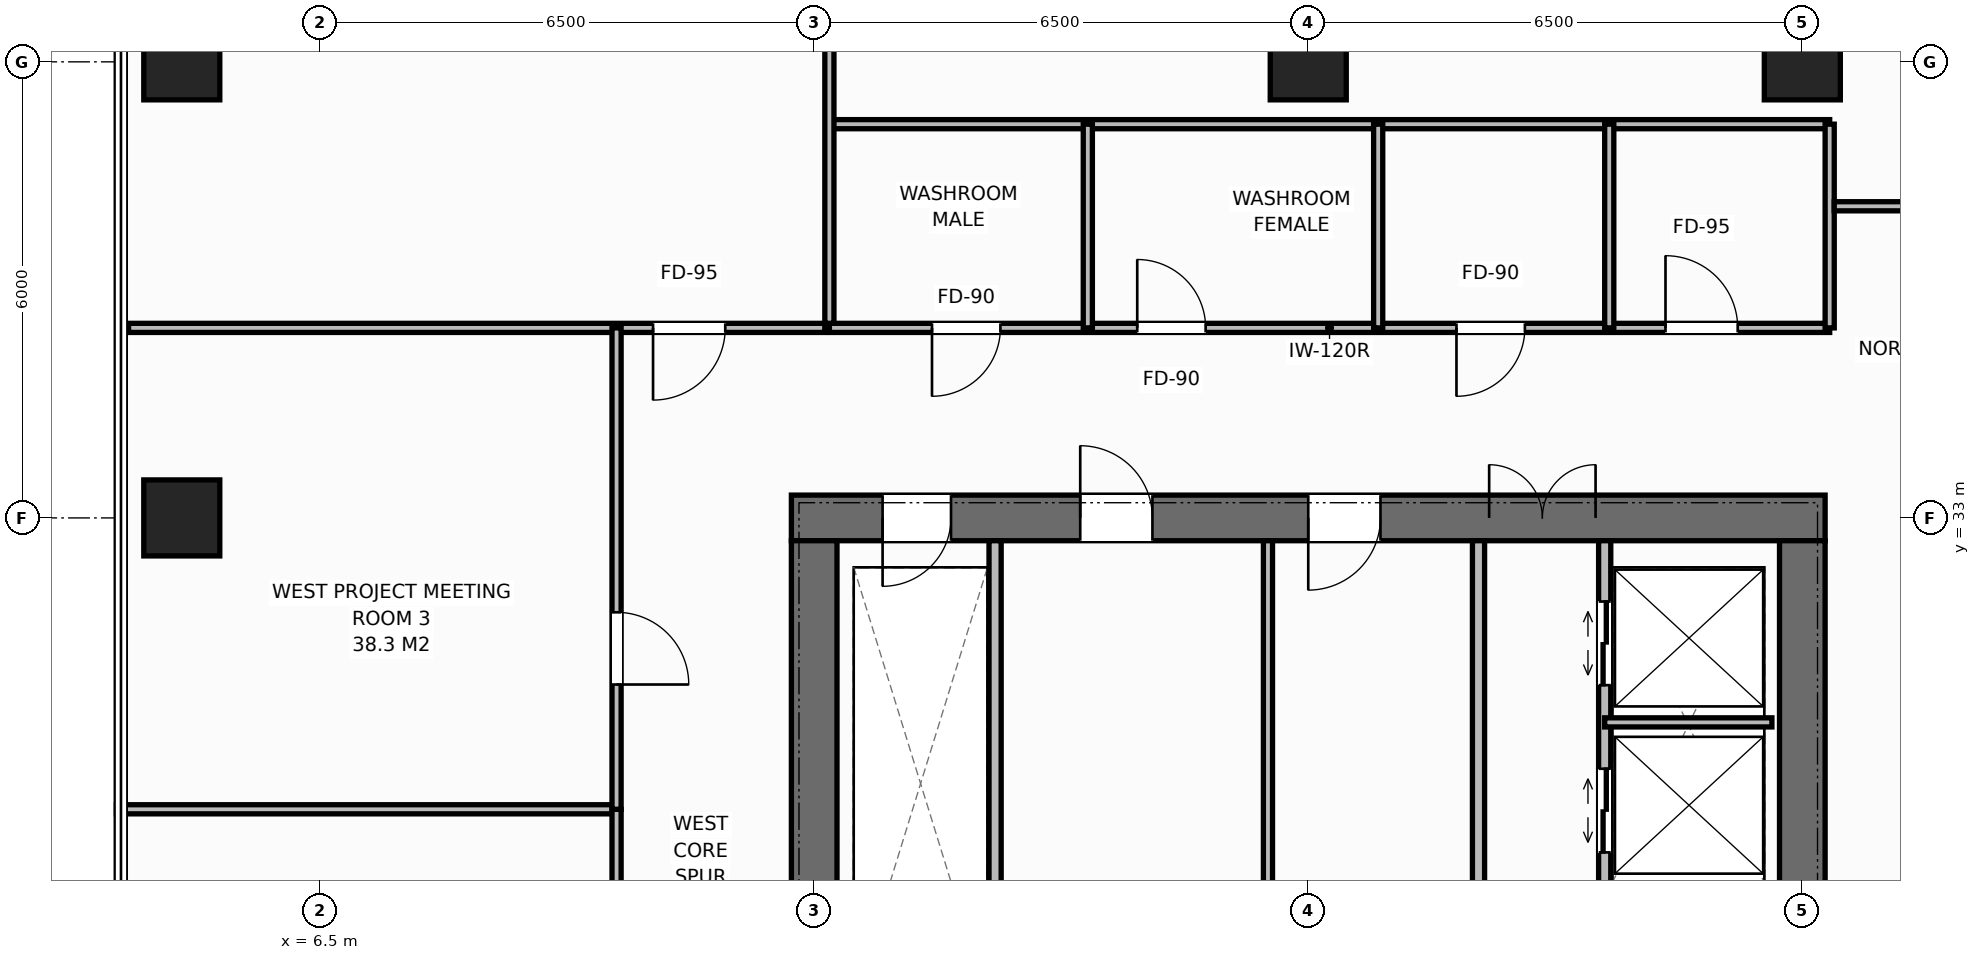
"""IFC4 building model, lengths in metres.
Left out: names, types, materials, properties, quantities, classifications, styles, units other than length and angle.
Written with IfcOpenShell. Run it as: python <this file> out.ifc"""

import sys

from ifc_helpers import new_model, si_unit, direction, frame, frame_2d, origin, origin_2d, place, context, subcontext, project, spatial, rectangle, extrude, element, fill, save


model = new_model("IFC4")
c1 = context("Model", 3, precision=1e-05, world=origin(), true_north=direction((0.0, 1.0)))
c2 = subcontext(c1, "Body", "Model", "MODEL_VIEW")
j1 = project(units=[si_unit("LENGTHUNIT", "METRE"), si_unit("PLANEANGLEUNIT", "RADIAN")], contexts=[c1])
p1 = place(None, origin())
s1 = spatial("IfcSite", under=j1, at=p1, CompositionType="ELEMENT")
p2 = place(p1, origin())
s2 = spatial("IfcBuilding", under=s1, at=p2, CompositionType="ELEMENT")
p3 = place(p2, frame((0.0, 0.0, 189.8)))
s3 = spatial("IfcBuildingStorey", under=s2, at=p3, CompositionType="ELEMENT", Elevation=189.8)
p4 = place(p3, frame((12.7, 33.0, 0.0), z_axis=(0.0, 0.0, 1.0), x_axis=(1.0, 0.0, 0.0)))
e1 = element("IfcWall", 1, at=p4, inside=s3, PredefinedType="SHEAR", context=c2, shape_type="SweptSolid", body=[
    extrude(rectangle(XDim=13.6, YDim=0.6, at=frame_2d((6.8, 0.0))), origin(), (0.0, 0.0, 1.0), 3.8),
])
p5 = place(p4, frame((1.2, 0.0, 0.0)))
e2 = element("IfcOpeningElement", 2, at=p5, cuts=e1, PredefinedType="OPENING", context=c2, shape_type="SweptSolid", body=[
    extrude(rectangle(XDim=0.9, YDim=2.15, at=frame_2d((0.45, 1.075))), frame((0.0, 0.31, 0.0), z_axis=(0.0, -1.0, 0.0), x_axis=(1.0, 0.0, 0.0)), (0.0, 0.0, 1.0), 0.62),
])
p6 = place(p4, frame((3.8, 0.0, 0.0)))
e3 = element("IfcOpeningElement", 3, at=p6, cuts=e1, PredefinedType="OPENING", context=c2, shape_type="SweptSolid", body=[
    extrude(rectangle(XDim=0.95, YDim=2.15, at=frame_2d((0.475, 1.075))), frame((0.0, 0.31, 0.0), z_axis=(0.0, -1.0, 0.0), x_axis=(1.0, 0.0, 0.0)), (0.0, 0.0, 1.0), 0.62),
])
p7 = place(p4, frame((6.8, 0.0, 0.0)))
e4 = element("IfcOpeningElement", 4, at=p7, cuts=e1, PredefinedType="OPENING", context=c2, shape_type="SweptSolid", body=[
    extrude(rectangle(XDim=0.95, YDim=2.15, at=frame_2d((0.475, 1.075))), frame((0.0, 0.31, 0.0), z_axis=(0.0, -1.0, 0.0), x_axis=(1.0, 0.0, 0.0)), (0.0, 0.0, 1.0), 0.62),
])
p8 = place(p4, frame((9.18, 0.0, 0.0)))
e5 = element("IfcOpeningElement", 5, at=p8, cuts=e1, PredefinedType="OPENING", context=c2, shape_type="SweptSolid", body=[
    extrude(rectangle(XDim=1.4, YDim=2.2, at=frame_2d((0.7, 1.1))), frame((0.0, 0.31, 0.0), z_axis=(0.0, -1.0, 0.0), x_axis=(1.0, 0.0, 0.0)), (0.0, 0.0, 1.0), 0.62),
])
p9 = place(p3, frame((13.0, 19.3, 0.0), z_axis=(0.0, 0.0, 1.0), x_axis=(0.0, 1.0, 0.0)))
e6 = element("IfcWall", 6, at=p9, inside=s3, PredefinedType="SHEAR", context=c2, shape_type="SweptSolid", body=[
    extrude(rectangle(XDim=13.4, YDim=0.6, at=frame_2d((6.7, 0.0))), origin(), (0.0, 0.0, 1.0), 3.8),
])
p10 = place(p9, frame((4.75, 0.0, 0.0)))
e7 = element("IfcOpeningElement", 7, at=p10, cuts=e6, PredefinedType="OPENING", context=c2, shape_type="SweptSolid", body=[
    extrude(rectangle(XDim=1.4, YDim=2.2, at=frame_2d((0.7, 1.1))), frame((0.0, 0.31, 0.0), z_axis=(0.0, -1.0, 0.0), x_axis=(1.0, 0.0, 0.0)), (0.0, 0.0, 1.0), 0.62),
])
p11 = place(p3, frame((26.0, 19.3, 0.0), z_axis=(0.0, 0.0, 1.0), x_axis=(0.0, 1.0, 0.0)))
e8 = element("IfcWall", 8, at=p11, inside=s3, PredefinedType="SHEAR", context=c2, shape_type="SweptSolid", body=[
    extrude(rectangle(XDim=13.4, YDim=0.6, at=frame_2d((6.7, 0.0))), origin(), (0.0, 0.0, 1.0), 3.8),
])
for number, where, z_axis, x_axis in (
    (9, (19.5, 39.0, 0.0), (0.0, 0.0, 1.0), (1.0, 0.0, 0.0)),
    (10, (26.0, 39.0, 0.0), (0.0, 0.0, 1.0), (1.0, 0.0, 0.0)),
    (11, (4.68, 33.0, 0.0), (0.0, 0.0, 1.0), (1.0, 0.0, 0.0)),
    (12, (4.68, 39.0, 0.0), (0.0, 0.0, 1.0), (1.0, 0.0, 0.0)),
):
    element("IfcColumn", number, at=place(p3, frame(where, z_axis=z_axis, x_axis=x_axis)), inside=s3, PredefinedType="COLUMN", context=c2, shape_type="SweptSolid", body=[
        extrude(rectangle(XDim=1.0, YDim=1.0, at=origin_2d()), origin(), (0.0, 0.0, 1.0), 3.8),
    ])
p12 = place(p3, frame((15.38, 26.56, 0.0), z_axis=(0.0, 0.0, 1.0), x_axis=(0.0, 1.0, 0.0)))
e13 = element("IfcWall", 13, at=p12, inside=s3, PredefinedType="STANDARD", context=c2, shape_type="SweptSolid", body=[
    extrude(rectangle(XDim=6.14, YDim=0.16, at=frame_2d((3.07, 0.0))), origin(), (0.0, 0.0, 1.0), 3.572),
])
p13 = place(p3, frame((18.97, 26.56, 0.0), z_axis=(0.0, 0.0, 1.0), x_axis=(0.0, 1.0, 0.0)))
e14 = element("IfcWall", 14, at=p13, inside=s3, PredefinedType="PARTITIONING", context=c2, shape_type="SweptSolid", body=[
    extrude(rectangle(XDim=6.14, YDim=0.12, at=frame_2d((3.07, 0.0))), origin(), (0.0, 0.0, 1.0), 3.572),
])
p14 = place(p3, frame((21.74, 26.56, 0.0), z_axis=(0.0, 0.0, 1.0), x_axis=(0.0, 1.0, 0.0)))
e15 = element("IfcWall", 15, at=p14, inside=s3, PredefinedType="STANDARD", context=c2, shape_type="SweptSolid", body=[
    extrude(rectangle(XDim=6.14, YDim=0.16, at=frame_2d((3.07, 0.0))), origin(), (0.0, 0.0, 1.0), 3.572),
])
p15 = place(p3, frame((23.4, 19.3, 0.0), z_axis=(0.0, 0.0, 1.0), x_axis=(0.0, 1.0, 0.0)))
e16 = element("IfcWall", 16, at=p15, inside=s3, PredefinedType="STANDARD", context=c2, shape_type="SweptSolid", body=[
    extrude(rectangle(XDim=13.4, YDim=0.16, at=frame_2d((6.7, 0.0))), origin(), (0.0, 0.0, 1.0), 3.572),
])
p16 = place(p15, frame((2.2, 0.0, 0.0)))
e17 = element("IfcOpeningElement", 17, at=p16, cuts=e16, PredefinedType="OPENING", context=c2, shape_type="SweptSolid", body=[
    extrude(rectangle(XDim=0.95, YDim=2.15, at=frame_2d((0.475, 1.075))), frame((0.0, 0.09, 0.0), z_axis=(0.0, -1.0, 0.0), x_axis=(1.0, 0.0, 0.0)), (0.0, 0.0, 1.0), 0.18),
])
p17 = place(p15, frame((6.3, 0.0, 0.0)))
e18 = element("IfcOpeningElement", 18, at=p17, cuts=e16, PredefinedType="OPENING", context=c2, shape_type="SweptSolid", body=[
    extrude(rectangle(XDim=0.95, YDim=2.15, at=frame_2d((0.475, 1.075))), frame((0.0, 0.09, 0.0), z_axis=(0.0, -1.0, 0.0), x_axis=(1.0, 0.0, 0.0)), (0.0, 0.0, 1.0), 0.18),
])
p18 = place(p15, frame((9.3, 0.0, 0.0)))
e19 = element("IfcOpeningElement", 19, at=p18, cuts=e16, PredefinedType="OPENING", context=c2, shape_type="SweptSolid", body=[
    extrude(rectangle(XDim=1.1, YDim=2.2, at=frame_2d((0.55, 1.1))), frame((0.0, 0.09, 0.0), z_axis=(0.0, -1.0, 0.0), x_axis=(1.0, 0.0, 0.0)), (0.0, 0.0, 1.0), 0.18),
])
p19 = place(p15, frame((11.5, 0.0, 0.0)))
e20 = element("IfcOpeningElement", 20, at=p19, cuts=e16, PredefinedType="OPENING", context=c2, shape_type="SweptSolid", body=[
    extrude(rectangle(XDim=1.1, YDim=2.2, at=frame_2d((0.55, 1.1))), frame((0.0, 0.09, 0.0), z_axis=(0.0, -1.0, 0.0), x_axis=(1.0, 0.0, 0.0)), (0.0, 0.0, 1.0), 0.18),
])
p20 = place(p3, frame((23.4, 30.31, 0.0), z_axis=(0.0, 0.0, 1.0), x_axis=(1.0, 0.0, 0.0)))
e21 = element("IfcWall", 21, at=p20, inside=s3, PredefinedType="PARTITIONING", context=c2, shape_type="SweptSolid", body=[
    extrude(rectangle(XDim=2.2, YDim=0.12, at=frame_2d((1.1, 0.0))), origin(), (0.0, 0.0, 1.0), 3.572),
])
p21 = place(p3, frame((13.2, 35.5, 0.0), z_axis=(0.0, 0.0, 1.0), x_axis=(1.0, 0.0, 0.0)))
e22 = element("IfcWall", 22, at=p21, inside=s3, PredefinedType="PARTITIONING", context=c2, shape_type="SweptSolid", body=[
    extrude(rectangle(XDim=13.16, YDim=0.12, at=frame_2d((6.58, 0.0))), origin(), (0.0, 0.0, 1.0), 3.572),
])
p22 = place(p21, frame((1.35, 0.0, 0.0)))
e23 = element("IfcOpeningElement", 23, at=p22, cuts=e22, PredefinedType="OPENING", context=c2, shape_type="SweptSolid", body=[
    extrude(rectangle(XDim=0.9, YDim=2.15, at=frame_2d((0.45, 1.075))), frame((0.0, 0.07, 0.0), z_axis=(0.0, -1.0, 0.0), x_axis=(1.0, 0.0, 0.0)), (0.0, 0.0, 1.0), 0.14),
])
p23 = place(p21, frame((4.05, 0.0, 0.0)))
e24 = element("IfcOpeningElement", 24, at=p23, cuts=e22, PredefinedType="OPENING", context=c2, shape_type="SweptSolid", body=[
    extrude(rectangle(XDim=0.9, YDim=2.15, at=frame_2d((0.45, 1.075))), frame((0.0, 0.07, 0.0), z_axis=(0.0, -1.0, 0.0), x_axis=(1.0, 0.0, 0.0)), (0.0, 0.0, 1.0), 0.14),
])
p24 = place(p21, frame((8.25, 0.0, 0.0)))
e25 = element("IfcOpeningElement", 25, at=p24, cuts=e22, PredefinedType="OPENING", context=c2, shape_type="SweptSolid", body=[
    extrude(rectangle(XDim=0.9, YDim=2.15, at=frame_2d((0.45, 1.075))), frame((0.0, 0.07, 0.0), z_axis=(0.0, -1.0, 0.0), x_axis=(1.0, 0.0, 0.0)), (0.0, 0.0, 1.0), 0.14),
])
p25 = place(p21, frame((11.0, 0.0, 0.0)))
e26 = element("IfcOpeningElement", 26, at=p25, cuts=e22, PredefinedType="OPENING", context=c2, shape_type="SweptSolid", body=[
    extrude(rectangle(XDim=0.95, YDim=2.15, at=frame_2d((0.475, 1.075))), frame((0.0, 0.07, 0.0), z_axis=(0.0, -1.0, 0.0), x_axis=(1.0, 0.0, 0.0)), (0.0, 0.0, 1.0), 0.14),
])
p26 = place(p3, frame((13.2, 38.18, 0.0), z_axis=(0.0, 0.0, 1.0), x_axis=(1.0, 0.0, 0.0)))
e27 = element("IfcWall", 27, at=p26, inside=s3, PredefinedType="PARTITIONING", context=c2, shape_type="SweptSolid", body=[
    extrude(rectangle(XDim=13.16, YDim=0.12, at=frame_2d((6.58, 0.0))), origin(), (0.0, 0.0, 1.0), 3.572),
])
for number, where, z_axis, x_axis in (
    (28, (16.6, 35.5, 0.0), (0.0, 0.0, 1.0), (0.0, 1.0, 0.0)),
    (29, (20.42, 35.5, 0.0), (0.0, 0.0, 1.0), (0.0, 1.0, 0.0)),
    (30, (23.46, 35.5, 0.0), (0.0, 0.0, 1.0), (0.0, 1.0, 0.0)),
    (31, (26.36, 35.5, 0.0), (0.0, 0.0, 1.0), (0.0, 1.0, 0.0)),
):
    element("IfcWall", number, at=place(p3, frame(where, z_axis=z_axis, x_axis=x_axis)), inside=s3, PredefinedType="PARTITIONING", context=c2, shape_type="SweptSolid", body=[
        extrude(rectangle(XDim=2.68, YDim=0.12, at=frame_2d((1.34, 0.0))), origin(), (0.0, 0.0, 1.0), 3.572),
    ])
p27 = place(p3, frame((13.2, 35.56, 0.0), z_axis=(0.0, 0.0, 1.0), x_axis=(0.0, 1.0, 0.0)))
e32 = element("IfcWall", 32, at=p27, inside=s3, PredefinedType="PARTITIONING", context=c2, shape_type="SweptSolid", body=[
    extrude(rectangle(XDim=13.02, YDim=0.12, at=frame_2d((6.51, 0.0))), origin(), (0.0, 0.0, 1.0), 3.022),
])
p28 = place(p3, frame((3.98, 35.5, 0.0), z_axis=(0.0, 0.0, 1.0), x_axis=(1.0, 0.0, 0.0)))
e33 = element("IfcWall", 33, at=p28, inside=s3, PredefinedType="PARTITIONING", context=c2, shape_type="SweptSolid", body=[
    extrude(rectangle(XDim=9.16, YDim=0.12, at=frame_2d((4.58, 0.0))), origin(), (0.0, 0.0, 1.0), 3.572),
])
p29 = place(p28, frame((6.9, 0.0, 0.0)))
e34 = element("IfcOpeningElement", 34, at=p29, cuts=e33, PredefinedType="OPENING", context=c2, shape_type="SweptSolid", body=[
    extrude(rectangle(XDim=0.95, YDim=2.15, at=frame_2d((0.475, 1.075))), frame((0.0, 0.07, 0.0), z_axis=(0.0, -1.0, 0.0), x_axis=(1.0, 0.0, 0.0)), (0.0, 0.0, 1.0), 0.14),
])
p30 = place(p3, frame((26.42, 37.1, 0.0), z_axis=(0.0, 0.0, 1.0), x_axis=(1.0, 0.0, 0.0)))
e35 = element("IfcWall", 35, at=p30, inside=s3, PredefinedType="PARTITIONING", context=c2, shape_type="SweptSolid", body=[
    extrude(rectangle(XDim=9.32, YDim=0.12, at=frame_2d((4.66, 0.0))), origin(), (0.0, 0.0, 1.0), 3.572),
])
p31 = place(p30, frame((4.185, 0.0, 0.0)))
e36 = element("IfcOpeningElement", 36, at=p31, cuts=e35, PredefinedType="OPENING", context=c2, shape_type="SweptSolid", body=[
    extrude(rectangle(XDim=0.95, YDim=2.15, at=frame_2d((0.475, 1.075))), frame((0.0, 0.07, 0.0), z_axis=(0.0, -1.0, 0.0), x_axis=(1.0, 0.0, 0.0)), (0.0, 0.0, 1.0), 0.14),
])
p32 = place(p3, frame((3.82, 29.167, 0.0), z_axis=(0.0, 0.0, 1.0), x_axis=(1.0, 0.0, 0.0)))
e37 = element("IfcWall", 37, at=p32, inside=s3, PredefinedType="PARTITIONING", context=c2, shape_type="SweptSolid", body=[
    extrude(rectangle(XDim=6.58, YDim=0.12, at=frame_2d((3.29, 0.0))), origin(), (0.0, 0.0, 1.0), 3.572),
])
p33 = place(p3, frame((10.4, 22.833, 0.0), z_axis=(0.0, 0.0, 1.0), x_axis=(0.0, 1.0, 0.0)))
e38 = element("IfcWall", 38, at=p33, inside=s3, PredefinedType="PARTITIONING", context=c2, shape_type="SweptSolid", body=[
    extrude(rectangle(XDim=6.333, YDim=0.12, at=frame_2d((3.167, 0.0))), origin(), (0.0, 0.0, 1.0), 3.572),
])
p34 = place(p33, frame((2.692, 0.0, 0.0)))
e39 = element("IfcOpeningElement", 39, at=p34, cuts=e38, PredefinedType="OPENING", context=c2, shape_type="SweptSolid", body=[
    extrude(rectangle(XDim=0.95, YDim=2.15, at=frame_2d((0.475, 1.075))), frame((0.0, 0.07, 0.0), z_axis=(0.0, -1.0, 0.0), x_axis=(1.0, 0.0, 0.0)), (0.0, 0.0, 1.0), 0.14),
])
p35 = place(p3, frame((10.4, 29.167, 0.0), z_axis=(0.0, 0.0, 1.0), x_axis=(0.0, 1.0, 0.0)))
e40 = element("IfcWall", 40, at=p35, inside=s3, PredefinedType="PARTITIONING", context=c2, shape_type="SweptSolid", body=[
    extrude(rectangle(XDim=6.333, YDim=0.12, at=frame_2d((3.167, 0.0))), origin(), (0.0, 0.0, 1.0), 3.572),
])
p36 = place(p35, frame((1.642, 0.0, 0.0)))
e41 = element("IfcOpeningElement", 41, at=p36, cuts=e40, PredefinedType="OPENING", context=c2, shape_type="SweptSolid", body=[
    extrude(rectangle(XDim=0.95, YDim=2.15, at=frame_2d((0.475, 1.075))), frame((0.0, 0.07, 0.0), z_axis=(0.0, -1.0, 0.0), x_axis=(1.0, 0.0, 0.0)), (0.0, 0.0, 1.0), 0.14),
])
p37 = place(p5, origin())
e42 = element("IfcDoor", 42, at=p37, inside=s3, OperationType="SINGLE_SWING_RIGHT", PredefinedType="DOOR", context=c2, shape_type="SweptSolid", body=[
    extrude(rectangle(XDim=0.9, YDim=2.15, at=frame_2d((0.45, 1.075))), frame((0.0, -0.025, 0.0), z_axis=(0.0, -1.0, 0.0), x_axis=(1.0, 0.0, 0.0)), (0.0, 0.0, 1.0), 0.05),
])
fill(e2, e42)
p38 = place(p6, origin())
e43 = element("IfcDoor", 43, at=p38, inside=s3, OperationType="SINGLE_SWING_LEFT", PredefinedType="DOOR", context=c2, shape_type="SweptSolid", body=[
    extrude(rectangle(XDim=0.95, YDim=2.15, at=frame_2d((0.475, 1.075))), frame((0.0, -0.025, 0.0), z_axis=(0.0, -1.0, 0.0), x_axis=(1.0, 0.0, 0.0)), (0.0, 0.0, 1.0), 0.05),
])
fill(e3, e43)
p39 = place(p7, origin())
e44 = element("IfcDoor", 44, at=p39, inside=s3, OperationType="SINGLE_SWING_RIGHT", PredefinedType="DOOR", context=c2, shape_type="SweptSolid", body=[
    extrude(rectangle(XDim=0.95, YDim=2.15, at=frame_2d((0.475, 1.075))), frame((0.0, -0.025, 0.0), z_axis=(0.0, -1.0, 0.0), x_axis=(1.0, 0.0, 0.0)), (0.0, 0.0, 1.0), 0.05),
])
fill(e4, e44)
p40 = place(p8, origin())
e45 = element("IfcDoor", 45, at=p40, inside=s3, OperationType="DOUBLE_DOOR_SINGLE_SWING", PredefinedType="DOOR", context=c2, shape_type="SweptSolid", body=[
    extrude(rectangle(XDim=1.4, YDim=2.2, at=frame_2d((0.7, 1.1))), frame((0.0, -0.025, 0.0), z_axis=(0.0, -1.0, 0.0), x_axis=(1.0, 0.0, 0.0)), (0.0, 0.0, 1.0), 0.05),
])
fill(e5, e45)
p41 = place(p18, origin())
e46 = element("IfcDoor", 46, at=p41, inside=s3, OperationType="DOUBLE_DOOR_SLIDING", PredefinedType="DOOR", context=c2, shape_type="SweptSolid", body=[
    extrude(rectangle(XDim=1.1, YDim=2.2, at=frame_2d((0.55, 1.1))), frame((0.0, 0.025, 0.0), z_axis=(0.0, -1.0, 0.0), x_axis=(1.0, 0.0, 0.0)), (0.0, 0.0, 1.0), 0.05),
])
fill(e19, e46)
p42 = place(p19, origin())
e47 = element("IfcDoor", 47, at=p42, inside=s3, OperationType="DOUBLE_DOOR_SLIDING", PredefinedType="DOOR", context=c2, shape_type="SweptSolid", body=[
    extrude(rectangle(XDim=1.1, YDim=2.2, at=frame_2d((0.55, 1.1))), frame((0.0, 0.025, 0.0), z_axis=(0.0, -1.0, 0.0), x_axis=(1.0, 0.0, 0.0)), (0.0, 0.0, 1.0), 0.05),
])
fill(e20, e47)
p43 = place(p22, origin())
e48 = element("IfcDoor", 48, at=p43, inside=s3, OperationType="SINGLE_SWING_RIGHT", PredefinedType="DOOR", context=c2, shape_type="SweptSolid", body=[
    extrude(rectangle(XDim=0.9, YDim=2.15, at=frame_2d((0.45, 1.075))), frame((0.0, 0.025, 0.0), z_axis=(0.0, -1.0, 0.0), x_axis=(1.0, 0.0, 0.0)), (0.0, 0.0, 1.0), 0.05),
])
fill(e23, e48)
p44 = place(p23, origin())
e49 = element("IfcDoor", 49, at=p44, inside=s3, OperationType="SINGLE_SWING_LEFT", PredefinedType="DOOR", context=c2, shape_type="SweptSolid", body=[
    extrude(rectangle(XDim=0.9, YDim=2.15, at=frame_2d((0.45, 1.075))), frame((0.0, 0.025, 0.0), z_axis=(0.0, -1.0, 0.0), x_axis=(1.0, 0.0, 0.0)), (0.0, 0.0, 1.0), 0.05),
])
fill(e24, e49)
p45 = place(p24, origin())
e50 = element("IfcDoor", 50, at=p45, inside=s3, OperationType="SINGLE_SWING_RIGHT", PredefinedType="DOOR", context=c2, shape_type="SweptSolid", body=[
    extrude(rectangle(XDim=0.9, YDim=2.15, at=frame_2d((0.45, 1.075))), frame((0.0, 0.025, 0.0), z_axis=(0.0, -1.0, 0.0), x_axis=(1.0, 0.0, 0.0)), (0.0, 0.0, 1.0), 0.05),
])
fill(e25, e50)
p46 = place(p25, origin())
e51 = element("IfcDoor", 51, at=p46, inside=s3, OperationType="SINGLE_SWING_LEFT", PredefinedType="DOOR", context=c2, shape_type="SweptSolid", body=[
    extrude(rectangle(XDim=0.95, YDim=2.15, at=frame_2d((0.475, 1.075))), frame((0.0, 0.025, 0.0), z_axis=(0.0, -1.0, 0.0), x_axis=(1.0, 0.0, 0.0)), (0.0, 0.0, 1.0), 0.05),
])
fill(e26, e51)
p47 = place(p29, origin())
e52 = element("IfcDoor", 52, at=p47, inside=s3, OperationType="SINGLE_SWING_RIGHT", PredefinedType="DOOR", context=c2, shape_type="SweptSolid", body=[
    extrude(rectangle(XDim=0.95, YDim=2.15, at=frame_2d((0.475, 1.075))), frame((0.0, 0.025, 0.0), z_axis=(0.0, -1.0, 0.0), x_axis=(1.0, 0.0, 0.0)), (0.0, 0.0, 1.0), 0.05),
])
fill(e34, e52)
p48 = place(p36, origin())
e53 = element("IfcDoor", 53, at=p48, inside=s3, OperationType="SINGLE_SWING_RIGHT", PredefinedType="DOOR", context=c2, shape_type="SweptSolid", body=[
    extrude(rectangle(XDim=0.95, YDim=2.15, at=frame_2d((0.475, 1.075))), frame((0.0, 0.025, 0.0), z_axis=(0.0, -1.0, 0.0), x_axis=(1.0, 0.0, 0.0)), (0.0, 0.0, 1.0), 0.05),
])
fill(e41, e53)
save(model, sys.argv[1])
